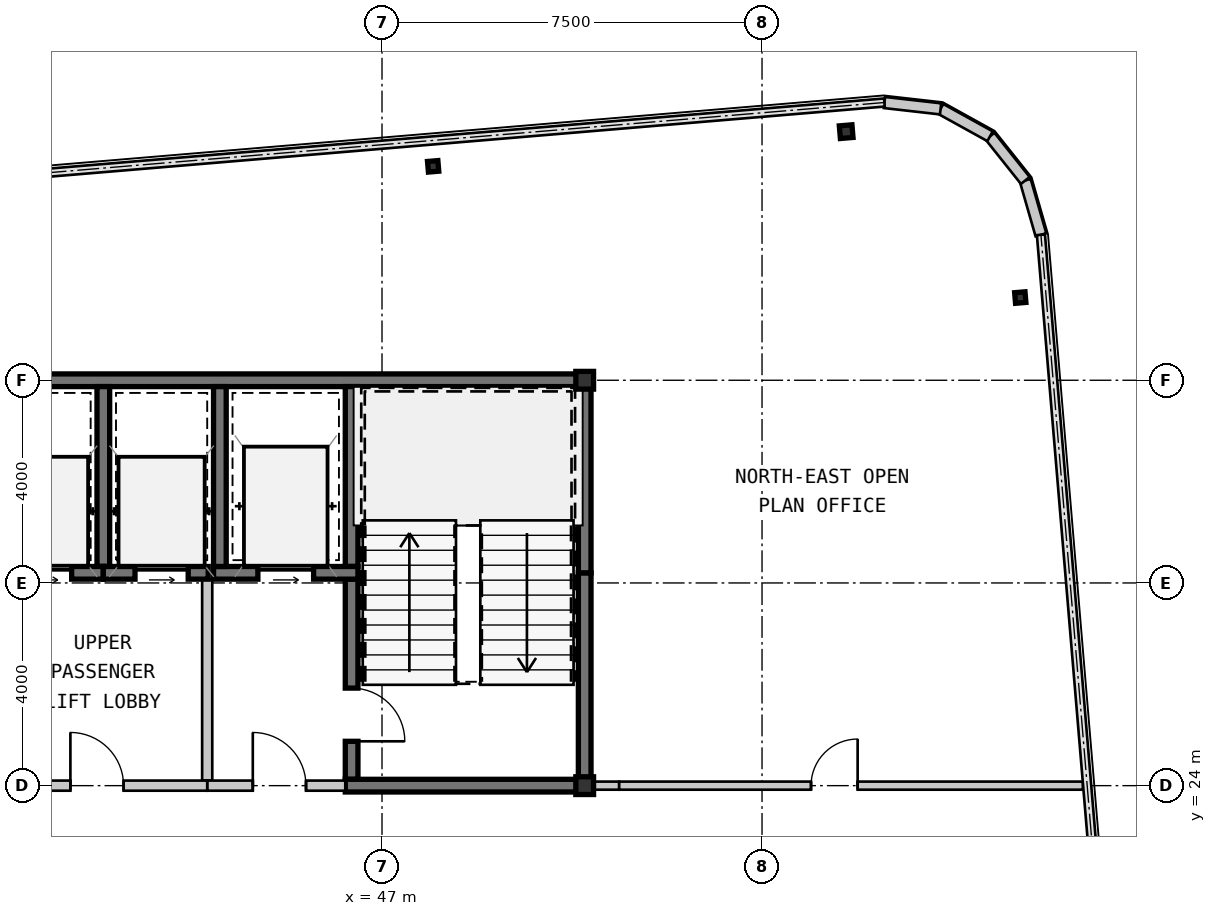
"""IFC4 building model, lengths in metres.
Left out: names, types, materials, properties, quantities, classifications, styles, units other than length and angle.
Written with IfcOpenShell. Run it as: python <this file> out.ifc"""

import sys

from ifc_helpers import new_model, si_unit, direction, frame, frame_2d, origin, origin_2d, place, context, subcontext, project, spatial, rectangle, hollow_rectangle, i_section, extrude, source, transform, mapped, element, fill, save


model = new_model("IFC4")
c1 = context("Model", 3, precision=1e-05, world=origin(), true_north=direction((0.0, 1.0)))
c2 = subcontext(c1, "Body", "Model", "MODEL_VIEW")
j1 = project(units=[si_unit("LENGTHUNIT", "METRE"), si_unit("PLANEANGLEUNIT", "RADIAN")], contexts=[c1])
p1 = place(None, origin())
s1 = spatial("IfcSite", under=j1, at=p1, CompositionType="ELEMENT")
p2 = place(p1, origin())
s2 = spatial("IfcBuilding", under=s1, at=p2, CompositionType="ELEMENT")
p3 = place(p2, frame((0.0, 0.0, 185.15)))
s3 = spatial("IfcBuildingStorey", under=s2, at=p3, CompositionType="ELEMENT", Elevation=185.15)
m1 = source(origin(), c2, "Body", "SweptSolid", [
    extrude(hollow_rectangle(XDim=0.35, YDim=0.35, WallThickness=0.016, at=origin_2d()), origin(), (0.0, 0.0, 1.0), 3.15),
])
for number, where, z_axis, x_axis in (
    (1, (51.0, 24.0, 0.0), (0.0, 0.0, 1.0), (1.0, 0.0, 0.0)),
    (2, (51.0, 32.0, 0.0), (0.0, 0.0, 1.0), (1.0, 0.0, 0.0)),
):
    element("IfcColumn", number, at=place(p3, frame(where, z_axis=z_axis, x_axis=x_axis)), inside=s3, PredefinedType="COLUMN", context=c2, shape_type="MappedRepresentation", body=[
        mapped(m1, transform((0.0, 0.0, 0.0), scale=1.0)),
    ])
m2 = source(origin(), c2, "Body", "SweptSolid", [
    extrude(i_section(OverallWidth=0.205, OverallDepth=0.21, WebThickness=0.009, FlangeThickness=0.014, at=origin_2d()), origin(), (0.0, 0.0, 1.0), 3.15),
])
p4 = place(p3, frame((48.009, 36.221, 0.0), z_axis=(0.0, 0.0, 1.0), x_axis=(0.99649285925, 0.083677843332, 0.0)))
e3 = element("IfcColumn", 3, at=p4, inside=s3, PredefinedType="COLUMN", context=c2, shape_type="MappedRepresentation", body=[
    mapped(m2, transform((0.0, 0.0, 0.0), scale=1.0)),
])
m3 = source(origin(), c2, "Body", "SweptSolid", [
    extrude(hollow_rectangle(XDim=0.25, YDim=0.25, WallThickness=0.01, at=origin_2d()), origin(), (0.0, 0.0, 1.0), 3.15),
])
p5 = place(p3, frame((56.16, 36.906, 0.0), z_axis=(0.0, 0.0, 1.0), x_axis=(0.99649285925, 0.083677843332, 0.0)))
e4 = element("IfcColumn", 4, at=p5, inside=s3, PredefinedType="COLUMN", context=c2, shape_type="MappedRepresentation", body=[
    mapped(m3, transform((0.0, 0.0, 0.0), scale=1.0)),
])
p6 = place(p3, frame((59.596, 33.632, 0.0), z_axis=(0.0, 0.0, 1.0), x_axis=(0.99649285925, 0.083677843332, 0.0)))
e5 = element("IfcColumn", 5, at=p6, inside=s3, PredefinedType="COLUMN", context=c2, shape_type="MappedRepresentation", body=[
    mapped(m2, transform((0.0, 0.0, 0.0), scale=1.0)),
])
m4 = source(origin(), c2, "Body", "SweptSolid", [
    extrude(rectangle(XDim=1.116, YDim=0.22, at=frame_2d((0.558, 0.0))), origin(), (0.0, 0.0, 1.0), 2.93),
])
for number, where, z_axis, x_axis in (
    (6, (60.004, 34.87, 0.0), (0.0, 0.0, 1.0), (-0.277, 0.961, 0.0)),
    (7, (59.696, 35.943, 0.0), (0.0, 0.0, 1.0), (-0.623, 0.782, 0.0)),
    (8, (59.0, 36.816, 0.0), (0.0, 0.0, 1.0), (-0.875, 0.484, 0.0)),
    (9, (58.024, 37.356, 0.0), (0.0, 0.0, 1.0), (-0.994, 0.112, 0.0)),
):
    element("IfcWall", number, at=place(p3, frame(where, z_axis=z_axis, x_axis=x_axis)), inside=s3, PredefinedType="SOLIDWALL", context=c2, shape_type="MappedRepresentation", body=[
        mapped(m4, transform((0.0, 0.0, 0.0), scale=1.0)),
    ])
m5 = source(origin(), c2, "Body", "SweptSolid", [
    extrude(rectangle(XDim=11.925, YDim=0.25, at=frame_2d((5.962, 0.0))), origin(), (0.0, 0.0, 1.0), 2.93),
])
p7 = place(p3, frame((39.2, 32.0, 0.0), z_axis=(0.0, 0.0, 1.0), x_axis=(1.0, 0.0, 0.0)))
e10 = element("IfcWall", 10, at=p7, inside=s3, PredefinedType="SHEAR", context=c2, shape_type="MappedRepresentation", body=[
    mapped(m5, transform((0.0, 0.0, 0.0), scale=1.0)),
])
m6 = source(origin(), c2, "Body", "SweptSolid", [
    extrude(rectangle(XDim=4.075, YDim=0.25, at=frame_2d((2.038, 0.0))), origin(), (0.0, 0.0, 1.0), 2.93),
])
p8 = place(p3, frame((51.0, 24.125, 0.0), z_axis=(0.0, 0.0, 1.0), x_axis=(0.0, 1.0, 0.0)))
e11 = element("IfcWall", 11, at=p8, inside=s3, PredefinedType="SHEAR", context=c2, shape_type="MappedRepresentation", body=[
    mapped(m6, transform((0.0, 0.0, 0.0), scale=1.0)),
])
m7 = source(origin(), c2, "Body", "SweptSolid", [
    extrude(rectangle(XDim=3.675, YDim=0.25, at=frame_2d((1.837, 0.0))), origin(), (0.0, 0.0, 1.0), 2.93),
])
p9 = place(p3, frame((51.0, 28.2, 0.0), z_axis=(0.0, 0.0, 1.0), x_axis=(0.0, 1.0, 0.0)))
e12 = element("IfcWall", 12, at=p9, inside=s3, PredefinedType="SHEAR", context=c2, shape_type="MappedRepresentation", body=[
    mapped(m7, transform((0.0, 0.0, 0.0), scale=1.0)),
])
m8 = source(origin(), c2, "Body", "SweptSolid", [
    extrude(rectangle(XDim=3.55, YDim=0.25, at=frame_2d((1.775, 0.0))), origin(), (0.0, 0.0, 1.0), 2.93),
])
p10 = place(p3, frame((46.4, 31.875, 0.0), z_axis=(0.0, 0.0, 1.0), x_axis=(0.0, -1.0, 0.0)))
e13 = element("IfcWall", 13, at=p10, inside=s3, PredefinedType="SHEAR", context=c2, shape_type="MappedRepresentation", body=[
    mapped(m8, transform((0.0, 0.0, 0.0), scale=1.0)),
])
m9 = source(origin(), c2, "Body", "SweptSolid", [
    extrude(rectangle(XDim=3.95, YDim=0.25, at=frame_2d((1.975, 0.0))), origin(), (0.0, 0.0, 1.0), 2.93),
])
p11 = place(p3, frame((46.4, 28.075, 0.0), z_axis=(0.0, 0.0, 1.0), x_axis=(0.0, -1.0, 0.0)))
e14 = element("IfcWall", 14, at=p11, inside=s3, PredefinedType="SHEAR", context=c2, shape_type="MappedRepresentation", body=[
    mapped(m9, transform((0.0, 0.0, 0.0), scale=1.0)),
])
m10 = source(origin(), c2, "Body", "SweptSolid", [
    extrude(rectangle(XDim=1.05, YDim=2.1, at=frame_2d((0.525, 1.05))), frame((0.0, 0.135, 0.0), z_axis=(0.0, -1.0, 0.0), x_axis=(1.0, 0.0, 0.0)), (0.0, 0.0, 1.0), 0.27),
])
p12 = place(p11, frame((2.15, 0.0, 0.0)))
e15 = element("IfcOpeningElement", 15, at=p12, cuts=e14, PredefinedType="OPENING", context=c2, shape_type="MappedRepresentation", body=[
    mapped(m10, transform((0.0, 0.0, 0.0), scale=1.0)),
])
m11 = source(origin(), c2, "Body", "SweptSolid", [
    extrude(rectangle(XDim=4.85, YDim=0.25, at=frame_2d((2.425, 0.0))), origin(), (0.0, 0.0, 1.0), 2.93),
])
p13 = place(p3, frame((46.275, 24.0, 0.0), z_axis=(0.0, 0.0, 1.0), x_axis=(1.0, 0.0, 0.0)))
e16 = element("IfcWall", 16, at=p13, inside=s3, PredefinedType="SHEAR", context=c2, shape_type="MappedRepresentation", body=[
    mapped(m11, transform((0.0, 0.0, 0.0), scale=1.0)),
])
m12 = source(origin(), c2, "Body", "SweptSolid", [
    extrude(rectangle(XDim=2.85, YDim=0.25, at=frame_2d((1.425, 0.0))), origin(), (0.0, 0.0, 1.0), 2.93),
])
p14 = place(p3, frame((43.675, 28.2, 0.0), z_axis=(0.0, 0.0, 1.0), x_axis=(1.0, 0.0, 0.0)))
e17 = element("IfcWall", 17, at=p14, inside=s3, PredefinedType="SHEAR", context=c2, shape_type="MappedRepresentation", body=[
    mapped(m12, transform((0.0, 0.0, 0.0), scale=1.0)),
])
m13 = source(origin(), c2, "Body", "SweptSolid", [
    extrude(rectangle(XDim=1.1, YDim=2.15, at=frame_2d((0.55, 1.075))), frame((0.0, 0.135, 0.0), z_axis=(0.0, -1.0, 0.0), x_axis=(1.0, 0.0, 0.0)), (0.0, 0.0, 1.0), 0.27),
])
p15 = place(p14, frame((0.875, 0.0, 0.0)))
e18 = element("IfcOpeningElement", 18, at=p15, cuts=e17, PredefinedType="OPENING", context=c2, shape_type="MappedRepresentation", body=[
    mapped(m13, transform((0.0, 0.0, 0.0), scale=1.0)),
])
p16 = place(p3, frame((43.8, 31.875, 0.0), z_axis=(0.0, 0.0, 1.0), x_axis=(0.0, -1.0, 0.0)))
e19 = element("IfcWall", 19, at=p16, inside=s3, PredefinedType="SHEAR", context=c2, shape_type="MappedRepresentation", body=[
    mapped(m8, transform((0.0, 0.0, 0.0), scale=1.0)),
])
m14 = source(origin(), c2, "Body", "SweptSolid", [
    extrude(rectangle(XDim=3.975, YDim=0.2, at=frame_2d((1.987, 0.0))), origin(), (0.0, 0.0, 1.0), 2.93),
])
p17 = place(p3, frame((43.55, 28.075, 0.0), z_axis=(0.0, 0.0, 1.0), x_axis=(0.0, -1.0, 0.0)))
e20 = element("IfcWall", 20, at=p17, inside=s3, PredefinedType="SOLIDWALL", context=c2, shape_type="MappedRepresentation", body=[
    mapped(m14, transform((0.0, 0.0, 0.0), scale=1.0)),
])
m15 = source(origin(), c2, "Body", "SweptSolid", [
    extrude(rectangle(XDim=2.725, YDim=0.2, at=frame_2d((1.362, 0.0))), origin(), (0.0, 0.0, 1.0), 2.397),
])
p18 = place(p3, frame((43.55, 24.0, 0.0), z_axis=(0.0, 0.0, 1.0), x_axis=(1.0, 0.0, 0.0)))
e21 = element("IfcWall", 21, at=p18, inside=s3, PredefinedType="SOLIDWALL", context=c2, shape_type="MappedRepresentation", body=[
    mapped(m15, transform((0.0, 0.0, 0.0), scale=1.0)),
])
m16 = source(origin(), c2, "Body", "SweptSolid", [
    extrude(rectangle(XDim=1.05, YDim=2.1, at=frame_2d((0.525, 1.05))), frame((0.0, 0.11, 0.0), z_axis=(0.0, -1.0, 0.0), x_axis=(1.0, 0.0, 0.0)), (0.0, 0.0, 1.0), 0.22),
])
p19 = place(p18, frame((0.9, 0.0, 0.0)))
e22 = element("IfcOpeningElement", 22, at=p19, cuts=e21, PredefinedType="OPENING", context=c2, shape_type="MappedRepresentation", body=[
    mapped(m16, transform((0.0, 0.0, 0.0), scale=1.0)),
])
p20 = place(p3, frame((41.5, 28.325, 0.0), z_axis=(0.0, 0.0, 1.0), x_axis=(0.0, 1.0, 0.0)))
e23 = element("IfcWall", 23, at=p20, inside=s3, PredefinedType="SHEAR", context=c2, shape_type="MappedRepresentation", body=[
    mapped(m8, transform((0.0, 0.0, 0.0), scale=1.0)),
])
m17 = source(origin(), c2, "Body", "SweptSolid", [
    extrude(rectangle(XDim=2.425, YDim=0.25, at=frame_2d((1.212, 0.0))), origin(), (0.0, 0.0, 1.0), 2.93),
])
p21 = place(p3, frame((39.075, 28.2, 0.0), z_axis=(0.0, 0.0, 1.0), x_axis=(1.0, 0.0, 0.0)))
e24 = element("IfcWall", 24, at=p21, inside=s3, PredefinedType="SHEAR", context=c2, shape_type="MappedRepresentation", body=[
    mapped(m17, transform((0.0, 0.0, 0.0), scale=1.0)),
])
m18 = source(origin(), c2, "Body", "SweptSolid", [
    extrude(rectangle(XDim=1.05, YDim=2.15, at=frame_2d((0.525, 1.075))), frame((0.0, 0.135, 0.0), z_axis=(0.0, -1.0, 0.0), x_axis=(1.0, 0.0, 0.0)), (0.0, 0.0, 1.0), 0.27),
])
p22 = place(p21, frame((0.75, 0.0, 0.0)))
e25 = element("IfcOpeningElement", 25, at=p22, cuts=e24, PredefinedType="OPENING", context=c2, shape_type="MappedRepresentation", body=[
    mapped(m18, transform((0.0, 0.0, 0.0), scale=1.0)),
])
m19 = source(origin(), c2, "Body", "SweptSolid", [
    extrude(rectangle(XDim=2.07, YDim=0.25, at=frame_2d((1.035, 0.0))), origin(), (0.0, 0.0, 1.0), 2.93),
])
p23 = place(p3, frame((41.5, 28.2, 0.0), z_axis=(0.0, 0.0, 1.0), x_axis=(1.0, 0.0, 0.0)))
e26 = element("IfcWall", 26, at=p23, inside=s3, PredefinedType="SHEAR", context=c2, shape_type="MappedRepresentation", body=[
    mapped(m19, transform((0.0, 0.0, 0.0), scale=1.0)),
])
p24 = place(p23, frame((0.625, 0.0, 0.0)))
e27 = element("IfcOpeningElement", 27, at=p24, cuts=e26, PredefinedType="OPENING", context=c2, shape_type="MappedRepresentation", body=[
    mapped(m18, transform((0.0, 0.0, 0.0), scale=1.0)),
])
m20 = source(origin(), c2, "Body", "SweptSolid", [
    extrude(rectangle(XDim=4.35, YDim=0.2, at=frame_2d((2.175, 0.0))), origin(), (0.0, 0.0, 1.0), 2.397),
])
p25 = place(p3, frame((43.55, 24.0, 0.0), z_axis=(0.0, 0.0, 1.0), x_axis=(-1.0, 0.0, 0.0)))
e28 = element("IfcWall", 28, at=p25, inside=s3, PredefinedType="SOLIDWALL", context=c2, shape_type="MappedRepresentation", body=[
    mapped(m20, transform((0.0, 0.0, 0.0), scale=1.0)),
])
p26 = place(p25, frame((1.65, 0.0, 0.0)))
e29 = element("IfcOpeningElement", 29, at=p26, cuts=e28, PredefinedType="OPENING", context=c2, shape_type="MappedRepresentation", body=[
    mapped(m16, transform((0.0, 0.0, 0.0), scale=1.0)),
])
m21 = source(origin(), c2, "Body", "SweptSolid", [
    extrude(rectangle(XDim=0.556, YDim=0.16, at=frame_2d((0.278, 0.0))), origin(), (0.0, 0.0, 1.0), 2.47),
])
p27 = place(p3, frame((51.125, 24.0, 0.0), z_axis=(0.0, 0.0, 1.0), x_axis=(1.0, 0.0, 0.0)))
e30 = element("IfcWall", 30, at=p27, inside=s3, PredefinedType="PARTITIONING", context=c2, shape_type="MappedRepresentation", body=[
    mapped(m21, transform((0.0, 0.0, 0.0), scale=1.0)),
])
m22 = source(origin(), c2, "Body", "SweptSolid", [
    extrude(rectangle(XDim=9.153, YDim=0.16, at=frame_2d((4.576, 0.0))), origin(), (0.0, 0.0, 1.0), 2.93),
])
p28 = place(p3, frame((51.681, 24.0, 0.0), z_axis=(0.0, 0.0, 1.0), x_axis=(1.0, 0.0, 0.0)))
e31 = element("IfcWall", 31, at=p28, inside=s3, PredefinedType="PARTITIONING", context=c2, shape_type="MappedRepresentation", body=[
    mapped(m22, transform((0.0, 0.0, 0.0), scale=1.0)),
])
m23 = source(origin(), c2, "Body", "SweptSolid", [
    extrude(rectangle(XDim=0.92, YDim=2.1, at=frame_2d((0.46, 1.05))), frame((0.0, 0.09, 0.0), z_axis=(0.0, -1.0, 0.0), x_axis=(1.0, 0.0, 0.0)), (0.0, 0.0, 1.0), 0.18),
])
p29 = place(p28, frame((3.786, 0.0, 0.0)))
e32 = element("IfcOpeningElement", 32, at=p29, cuts=e31, PredefinedType="OPENING", context=c2, shape_type="MappedRepresentation", body=[
    mapped(m23, transform((0.0, 0.0, 0.0), scale=1.0)),
])
m24 = source(origin(), c2, "Body", "SweptSolid", [
    extrude(rectangle(XDim=1.05, YDim=2.1, at=frame_2d((0.525, 1.05))), frame((0.0, 0.025, 0.0), z_axis=(0.0, -1.0, 0.0), x_axis=(1.0, 0.0, 0.0)), (0.0, 0.0, 1.0), 0.05),
])
p30 = place(p12, origin())
e33 = element("IfcDoor", 33, at=p30, inside=s3, OperationType="SINGLE_SWING_RIGHT", PredefinedType="DOOR", context=c2, shape_type="MappedRepresentation", body=[
    mapped(m24, transform((0.0, 0.0, 0.0), scale=1.0)),
])
fill(e15, e33)
m25 = source(origin(), c2, "Body", "SweptSolid", [
    extrude(rectangle(XDim=1.1, YDim=2.15, at=frame_2d((0.55, 1.075))), frame((0.0, 0.025, 0.0), z_axis=(0.0, -1.0, 0.0), x_axis=(1.0, 0.0, 0.0)), (0.0, 0.0, 1.0), 0.05),
])
p31 = place(p15, origin())
e34 = element("IfcDoor", 34, at=p31, inside=s3, OperationType="SLIDING_TO_LEFT", PredefinedType="DOOR", context=c2, shape_type="MappedRepresentation", body=[
    mapped(m25, transform((0.0, 0.0, 0.0), scale=1.0)),
])
fill(e18, e34)
p32 = place(p19, origin())
e35 = element("IfcDoor", 35, at=p32, inside=s3, OperationType="SINGLE_SWING_LEFT", PredefinedType="DOOR", context=c2, shape_type="MappedRepresentation", body=[
    mapped(m24, transform((0.0, 0.0, 0.0), scale=1.0)),
])
fill(e22, e35)
m26 = source(origin(), c2, "Body", "SweptSolid", [
    extrude(rectangle(XDim=1.05, YDim=2.15, at=frame_2d((0.525, 1.075))), frame((0.0, 0.025, 0.0), z_axis=(0.0, -1.0, 0.0), x_axis=(1.0, 0.0, 0.0)), (0.0, 0.0, 1.0), 0.05),
])
p33 = place(p22, origin())
e36 = element("IfcDoor", 36, at=p33, inside=s3, OperationType="SLIDING_TO_LEFT", PredefinedType="DOOR", context=c2, shape_type="MappedRepresentation", body=[
    mapped(m26, transform((0.0, 0.0, 0.0), scale=1.0)),
])
fill(e25, e36)
p34 = place(p24, origin())
e37 = element("IfcDoor", 37, at=p34, inside=s3, OperationType="SLIDING_TO_LEFT", PredefinedType="DOOR", context=c2, shape_type="MappedRepresentation", body=[
    mapped(m26, transform((0.0, 0.0, 0.0), scale=1.0)),
])
fill(e27, e37)
p35 = place(p26, frame((1.05, 0.0, 0.0), z_axis=(0.0, 0.0, 1.0), x_axis=(-1.0, 0.0, 0.0)))
e38 = element("IfcDoor", 38, at=p35, inside=s3, OperationType="SINGLE_SWING_LEFT", PredefinedType="DOOR", context=c2, shape_type="MappedRepresentation", body=[
    mapped(m24, transform((0.0, 0.0, 0.0), scale=1.0)),
])
fill(e29, e38)
m27 = source(origin(), c2, "Body", "SweptSolid", [
    extrude(rectangle(XDim=0.92, YDim=2.1, at=frame_2d((0.46, 1.05))), frame((0.0, 0.025, 0.0), z_axis=(0.0, -1.0, 0.0), x_axis=(1.0, 0.0, 0.0)), (0.0, 0.0, 1.0), 0.05),
])
p36 = place(p29, origin())
e39 = element("IfcDoor", 39, at=p36, inside=s3, OperationType="SINGLE_SWING_RIGHT", PredefinedType="DOOR", context=c2, shape_type="MappedRepresentation", body=[
    mapped(m27, transform((0.0, 0.0, 0.0), scale=1.0)),
])
fill(e32, e39)
save(model, sys.argv[1])
